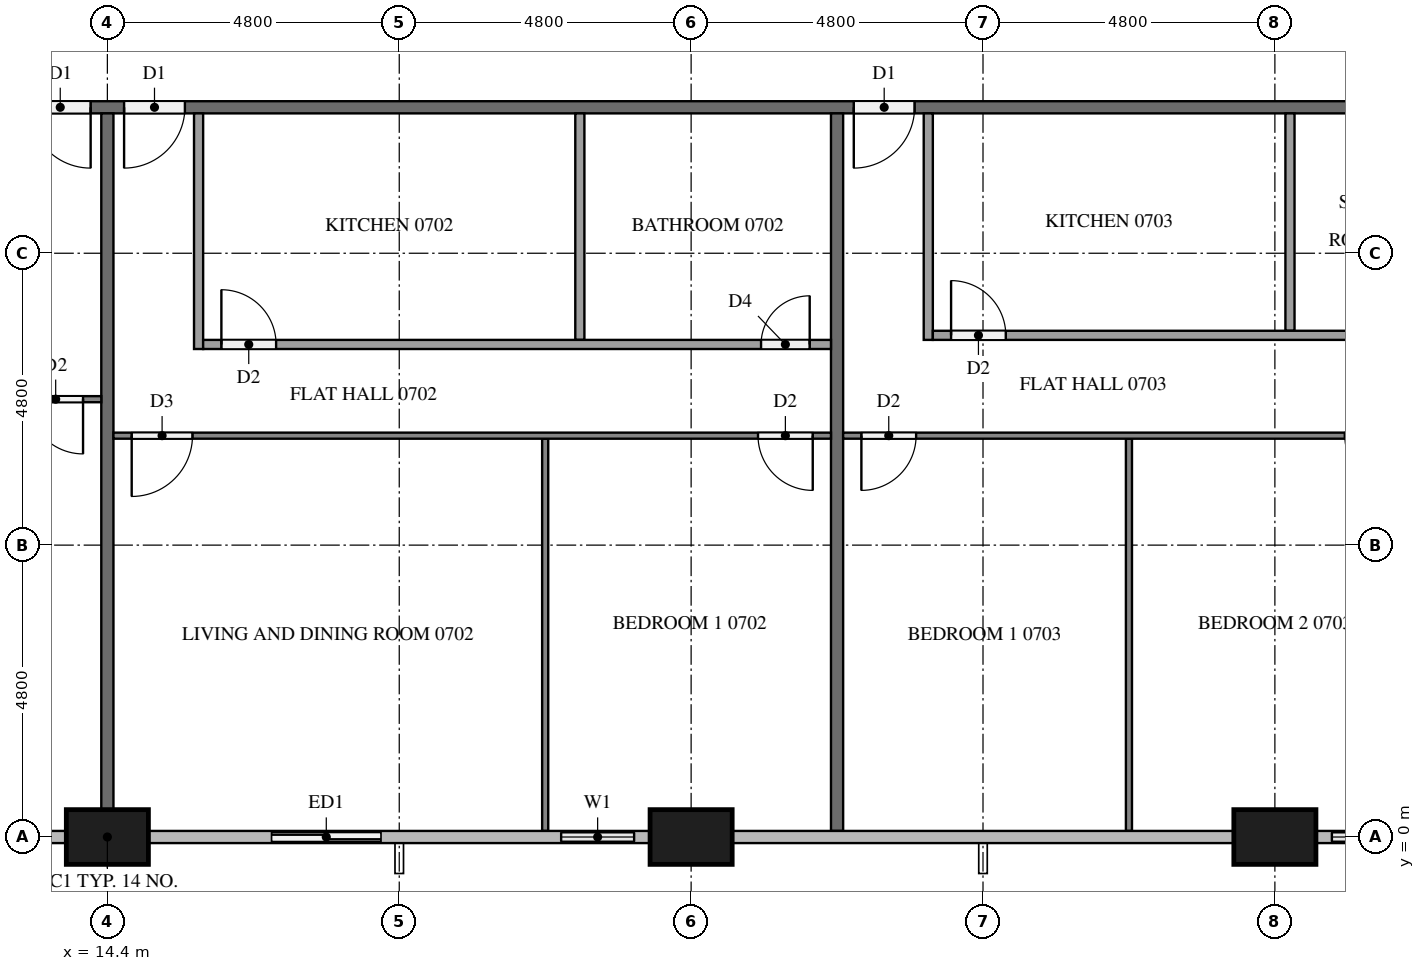
"""IFC4 building model, lengths in metres.
Left out: names, types, materials, properties, quantities, classifications, styles, units other than length and angle.
Written with IfcOpenShell. Run it as: python <this file> out.ifc"""

import sys

from ifc_helpers import new_model, si_unit, direction, frame, frame_2d, origin, origin_2d, place, context, subcontext, project, spatial, rectangle, extrude, element, fill, save


model = new_model("IFC4")
c1 = context("Model", 3, precision=1e-05, world=origin(), true_north=direction((0.0, 1.0)))
c2 = subcontext(c1, "Body", "Model", "MODEL_VIEW")
j1 = project(units=[si_unit("LENGTHUNIT", "METRE"), si_unit("PLANEANGLEUNIT", "RADIAN")], contexts=[c1])
p1 = place(None, origin())
s1 = spatial("IfcSite", under=j1, at=p1, CompositionType="ELEMENT")
p2 = place(p1, origin())
s2 = spatial("IfcBuilding", under=s1, at=p2, CompositionType="ELEMENT")
p3 = place(p2, frame((0.0, 0.0, 32.9)))
s3 = spatial("IfcBuildingStorey", under=s2, at=p3, CompositionType="ELEMENT", Elevation=32.9)
for number, where, z_axis, x_axis in (
    (1, (14.4, 0.0, 0.0), (0.0, 0.0, 1.0), (1.0, 0.0, 0.0)),
    (2, (24.0, 0.0, 0.0), (0.0, 0.0, 1.0), (1.0, 0.0, 0.0)),
    (3, (33.6, 0.0, 0.0), (0.0, 0.0, 1.0), (1.0, 0.0, 0.0)),
):
    element("IfcColumn", number, at=place(p3, frame(where, z_axis=z_axis, x_axis=x_axis)), inside=s3, PredefinedType="COLUMN", context=c2, shape_type="SweptSolid", body=[
        extrude(rectangle(XDim=1.35, YDim=0.9, at=origin_2d()), origin(), (0.0, 0.0, 1.0), 3.2),
    ])
p4 = place(p3, frame((12.0, 0.0, 0.0), z_axis=(0.0, 0.0, 1.0), x_axis=(1.0, 0.0, 0.0)))
e4 = element("IfcWall", 4, at=p4, inside=s3, PredefinedType="SOLIDWALL", context=c2, shape_type="SweptSolid", body=[
    extrude(rectangle(XDim=1.725, YDim=0.15, at=frame_2d((0.863, 0.0))), origin(), (0.0, 0.0, 1.0), 3.2),
])
p5 = place(p4, frame((0.262, 0.0, 0.9)))
e5 = element("IfcOpeningElement", 5, at=p5, cuts=e4, PredefinedType="OPENING", context=c2, shape_type="SweptSolid", body=[
    extrude(rectangle(XDim=1.2, YDim=1.4, at=frame_2d((0.6, 0.7))), frame((0.0, 0.085, 0.0), z_axis=(0.0, -1.0, 0.0), x_axis=(1.0, 0.0, 0.0)), (0.0, 0.0, 1.0), 0.17),
])
p6 = place(p3, frame((16.8, 0.0, 0.0), z_axis=(0.0, 0.0, 1.0), x_axis=(1.0, 0.0, 0.0)))
e6 = element("IfcWall", 6, at=p6, inside=s3, PredefinedType="SOLIDWALL", context=c2, shape_type="SweptSolid", body=[
    extrude(rectangle(XDim=2.4, YDim=0.15, at=frame_2d((1.2, 0.0))), origin(), (0.0, 0.0, 1.0), 3.2),
])
p7 = place(p6, frame((0.3, 0.0, 0.0)))
e7 = element("IfcOpeningElement", 7, at=p7, cuts=e6, PredefinedType="OPENING", context=c2, shape_type="SweptSolid", body=[
    extrude(rectangle(XDim=1.8, YDim=2.4, at=frame_2d((0.9, 1.2))), frame((0.0, 0.085, 0.0), z_axis=(0.0, -1.0, 0.0), x_axis=(1.0, 0.0, 0.0)), (0.0, 0.0, 1.0), 0.17),
])
p8 = place(p3, frame((21.6, 0.0, 0.0), z_axis=(0.0, 0.0, 1.0), x_axis=(1.0, 0.0, 0.0)))
e8 = element("IfcWall", 8, at=p8, inside=s3, PredefinedType="SOLIDWALL", context=c2, shape_type="SweptSolid", body=[
    extrude(rectangle(XDim=1.725, YDim=0.15, at=frame_2d((0.862, 0.0))), origin(), (0.0, 0.0, 1.0), 3.2),
])
p9 = place(p8, frame((0.262, 0.0, 0.9)))
e9 = element("IfcOpeningElement", 9, at=p9, cuts=e8, PredefinedType="OPENING", context=c2, shape_type="SweptSolid", body=[
    extrude(rectangle(XDim=1.2, YDim=1.4, at=frame_2d((0.6, 0.7))), frame((0.0, 0.085, 0.0), z_axis=(0.0, -1.0, 0.0), x_axis=(1.0, 0.0, 0.0)), (0.0, 0.0, 1.0), 0.17),
])
p10 = place(p3, frame((34.275, 0.0, 0.0), z_axis=(0.0, 0.0, 1.0), x_axis=(1.0, 0.0, 0.0)))
e10 = element("IfcWall", 10, at=p10, inside=s3, PredefinedType="SOLIDWALL", context=c2, shape_type="SweptSolid", body=[
    extrude(rectangle(XDim=4.125, YDim=0.15, at=frame_2d((2.062, 0.0))), origin(), (0.0, 0.0, 1.0), 3.2),
])
p11 = place(p10, frame((0.262, 0.0, 0.9)))
e11 = element("IfcOpeningElement", 11, at=p11, cuts=e10, PredefinedType="OPENING", context=c2, shape_type="SweptSolid", body=[
    extrude(rectangle(XDim=1.2, YDim=1.4, at=frame_2d((0.6, 0.7))), frame((0.0, 0.085, 0.0), z_axis=(0.0, -1.0, 0.0), x_axis=(1.0, 0.0, 0.0)), (0.0, 0.0, 1.0), 0.17),
])
p12 = place(p10, frame((2.025, 0.0, 0.0)))
e12 = element("IfcOpeningElement", 12, at=p12, cuts=e10, PredefinedType="OPENING", context=c2, shape_type="SweptSolid", body=[
    extrude(rectangle(XDim=1.8, YDim=2.4, at=frame_2d((0.9, 1.2))), frame((0.0, 0.085, 0.0), z_axis=(0.0, -1.0, 0.0), x_axis=(1.0, 0.0, 0.0)), (0.0, 0.0, 1.0), 0.17),
])
p13 = place(p3, frame((50.5, 12.0, 0.0), z_axis=(0.0, 0.0, 1.0), x_axis=(-1.0, 0.0, 0.0)))
e13 = element("IfcWall", 13, at=p13, inside=s3, PredefinedType="PARTITIONING", context=c2, shape_type="SweptSolid", body=[
    extrude(rectangle(XDim=38.6, YDim=0.2, at=frame_2d((19.3, 0.0))), origin(), (0.0, 0.0, 1.0), 3.2),
])
p14 = place(p13, frame((36.375, 0.0, 0.0)))
e14 = element("IfcOpeningElement", 14, at=p14, cuts=e13, PredefinedType="OPENING", context=c2, shape_type="SweptSolid", body=[
    extrude(rectangle(XDim=1.0, YDim=2.1, at=frame_2d((0.5, 1.05))), frame((0.0, 0.11, 0.0), z_axis=(0.0, -1.0, 0.0), x_axis=(1.0, 0.0, 0.0)), (0.0, 0.0, 1.0), 0.22),
])
p15 = place(p13, frame((34.825, 0.0, 0.0)))
e15 = element("IfcOpeningElement", 15, at=p15, cuts=e13, PredefinedType="OPENING", context=c2, shape_type="SweptSolid", body=[
    extrude(rectangle(XDim=1.0, YDim=2.1, at=frame_2d((0.5, 1.05))), frame((0.0, 0.11, 0.0), z_axis=(0.0, -1.0, 0.0), x_axis=(1.0, 0.0, 0.0)), (0.0, 0.0, 1.0), 0.22),
])
p16 = place(p13, frame((22.825, 0.0, 0.0)))
e16 = element("IfcOpeningElement", 16, at=p16, cuts=e13, PredefinedType="OPENING", context=c2, shape_type="SweptSolid", body=[
    extrude(rectangle(XDim=1.0, YDim=2.1, at=frame_2d((0.5, 1.05))), frame((0.0, 0.11, 0.0), z_axis=(0.0, -1.0, 0.0), x_axis=(1.0, 0.0, 0.0)), (0.0, 0.0, 1.0), 0.22),
])
p17 = place(p13, frame((8.425, 0.0, 0.0)))
e17 = element("IfcOpeningElement", 17, at=p17, cuts=e13, PredefinedType="OPENING", context=c2, shape_type="SweptSolid", body=[
    extrude(rectangle(XDim=1.0, YDim=2.1, at=frame_2d((0.5, 1.05))), frame((0.0, 0.11, 0.0), z_axis=(0.0, -1.0, 0.0), x_axis=(1.0, 0.0, 0.0)), (0.0, 0.0, 1.0), 0.22),
])
p18 = place(p13, frame((1.225, 0.0, 0.0)))
e18 = element("IfcOpeningElement", 18, at=p18, cuts=e13, PredefinedType="OPENING", context=c2, shape_type="SweptSolid", body=[
    extrude(rectangle(XDim=1.0, YDim=2.1, at=frame_2d((0.5, 1.05))), frame((0.0, 0.11, 0.0), z_axis=(0.0, -1.0, 0.0), x_axis=(1.0, 0.0, 0.0)), (0.0, 0.0, 1.0), 0.22),
])
p19 = place(p3, frame((14.4, 11.9, 0.0), z_axis=(0.0, 0.0, 1.0), x_axis=(0.0, -1.0, 0.0)))
e19 = element("IfcWall", 19, at=p19, inside=s3, PredefinedType="PARTITIONING", context=c2, shape_type="SweptSolid", body=[
    extrude(rectangle(XDim=11.45, YDim=0.2, at=frame_2d((5.725, 0.0))), origin(), (0.0, 0.0, 1.0), 3.2),
])
p20 = place(p3, frame((26.4, 11.9, 0.0), z_axis=(0.0, 0.0, 1.0), x_axis=(0.0, -1.0, 0.0)))
e20 = element("IfcWall", 20, at=p20, inside=s3, PredefinedType="PARTITIONING", context=c2, shape_type="SweptSolid", body=[
    extrude(rectangle(XDim=11.8, YDim=0.2, at=frame_2d((5.9, 0.0))), origin(), (0.0, 0.0, 1.0), 3.2),
])
p21 = place(p3, frame((14.3, 7.2, 0.0), z_axis=(0.0, 0.0, 1.0), x_axis=(-1.0, 0.0, 0.0)))
e21 = element("IfcWall", 21, at=p21, inside=s3, PredefinedType="PARTITIONING", context=c2, shape_type="SweptSolid", body=[
    extrude(rectangle(XDim=14.2, YDim=0.1, at=frame_2d((7.1, 0.0))), origin(), (0.0, 0.0, 1.0), 3.2),
])
p22 = place(p21, frame((0.3, 0.0, 0.0)))
e22 = element("IfcOpeningElement", 22, at=p22, cuts=e21, PredefinedType="OPENING", context=c2, shape_type="SweptSolid", body=[
    extrude(rectangle(XDim=0.9, YDim=2.1, at=frame_2d((0.45, 1.05))), frame((0.0, 0.06, 0.0), z_axis=(0.0, -1.0, 0.0), x_axis=(1.0, 0.0, 0.0)), (0.0, 0.0, 1.0), 0.12),
])
p23 = place(p21, frame((8.25, 0.0, 0.0)))
e23 = element("IfcOpeningElement", 23, at=p23, cuts=e21, PredefinedType="OPENING", context=c2, shape_type="SweptSolid", body=[
    extrude(rectangle(XDim=0.9, YDim=2.1, at=frame_2d((0.45, 1.05))), frame((0.0, 0.06, 0.0), z_axis=(0.0, -1.0, 0.0), x_axis=(1.0, 0.0, 0.0)), (0.0, 0.0, 1.0), 0.12),
])
p24 = place(p21, frame((9.85, 0.0, 0.0)))
e24 = element("IfcOpeningElement", 24, at=p24, cuts=e21, PredefinedType="OPENING", context=c2, shape_type="SweptSolid", body=[
    extrude(rectangle(XDim=1.0, YDim=2.1, at=frame_2d((0.5, 1.05))), frame((0.0, 0.06, 0.0), z_axis=(0.0, -1.0, 0.0), x_axis=(1.0, 0.0, 0.0)), (0.0, 0.0, 1.0), 0.12),
])
p25 = place(p3, frame((21.6, 6.55, 0.0), z_axis=(0.0, 0.0, 1.0), x_axis=(0.0, -1.0, 0.0)))
e25 = element("IfcWall", 25, at=p25, inside=s3, PredefinedType="PARTITIONING", context=c2, shape_type="SweptSolid", body=[
    extrude(rectangle(XDim=6.45, YDim=0.1, at=frame_2d((3.225, 0.0))), origin(), (0.0, 0.0, 1.0), 3.2),
])
p26 = place(p3, frame((26.3, 6.6, 0.0), z_axis=(0.0, 0.0, 1.0), x_axis=(-1.0, 0.0, 0.0)))
e26 = element("IfcWall", 26, at=p26, inside=s3, PredefinedType="PARTITIONING", context=c2, shape_type="SweptSolid", body=[
    extrude(rectangle(XDim=11.8, YDim=0.1, at=frame_2d((5.9, 0.0))), origin(), (0.0, 0.0, 1.0), 3.2),
])
p27 = place(p26, frame((10.5, 0.0, 0.0)))
e27 = element("IfcOpeningElement", 27, at=p27, cuts=e26, PredefinedType="OPENING", context=c2, shape_type="SweptSolid", body=[
    extrude(rectangle(XDim=1.0, YDim=2.1, at=frame_2d((0.5, 1.05))), frame((0.0, 0.06, 0.0), z_axis=(0.0, -1.0, 0.0), x_axis=(1.0, 0.0, 0.0)), (0.0, 0.0, 1.0), 0.12),
])
p28 = place(p26, frame((0.3, 0.0, 0.0)))
e28 = element("IfcOpeningElement", 28, at=p28, cuts=e26, PredefinedType="OPENING", context=c2, shape_type="SweptSolid", body=[
    extrude(rectangle(XDim=0.9, YDim=2.1, at=frame_2d((0.45, 1.05))), frame((0.0, 0.06, 0.0), z_axis=(0.0, -1.0, 0.0), x_axis=(1.0, 0.0, 0.0)), (0.0, 0.0, 1.0), 0.12),
])
p29 = place(p3, frame((22.17, 11.9, 0.0), z_axis=(0.0, 0.0, 1.0), x_axis=(0.0, -1.0, 0.0)))
e29 = element("IfcWall", 29, at=p29, inside=s3, PredefinedType="PARTITIONING", context=c2, shape_type="SweptSolid", body=[
    extrude(rectangle(XDim=3.725, YDim=0.15, at=frame_2d((1.862, 0.0))), origin(), (0.0, 0.0, 1.0), 3.2),
])
p30 = place(p3, frame((15.9, 11.9, 0.0), z_axis=(0.0, 0.0, 1.0), x_axis=(0.0, -1.0, 0.0)))
e30 = element("IfcWall", 30, at=p30, inside=s3, PredefinedType="PARTITIONING", context=c2, shape_type="SweptSolid", body=[
    extrude(rectangle(XDim=3.875, YDim=0.15, at=frame_2d((1.938, 0.0))), origin(), (0.0, 0.0, 1.0), 3.2),
])
p31 = place(p3, frame((15.975, 8.1, 0.0), z_axis=(0.0, 0.0, 1.0), x_axis=(1.0, 0.0, 0.0)))
e31 = element("IfcWall", 31, at=p31, inside=s3, PredefinedType="PARTITIONING", context=c2, shape_type="SweptSolid", body=[
    extrude(rectangle(XDim=10.325, YDim=0.15, at=frame_2d((5.163, 0.0))), origin(), (0.0, 0.0, 1.0), 3.2),
])
p32 = place(p31, frame((0.3, 0.0, 0.0)))
e32 = element("IfcOpeningElement", 32, at=p32, cuts=e31, PredefinedType="OPENING", context=c2, shape_type="SweptSolid", body=[
    extrude(rectangle(XDim=0.9, YDim=2.1, at=frame_2d((0.45, 1.05))), frame((0.0, 0.085, 0.0), z_axis=(0.0, -1.0, 0.0), x_axis=(1.0, 0.0, 0.0)), (0.0, 0.0, 1.0), 0.17),
])
p33 = place(p31, frame((9.175, 0.0, 0.0)))
e33 = element("IfcOpeningElement", 33, at=p33, cuts=e31, PredefinedType="OPENING", context=c2, shape_type="SweptSolid", body=[
    extrude(rectangle(XDim=0.8, YDim=2.1, at=frame_2d((0.4, 1.05))), frame((0.0, 0.085, 0.0), z_axis=(0.0, -1.0, 0.0), x_axis=(1.0, 0.0, 0.0)), (0.0, 0.0, 1.0), 0.17),
])
p34 = place(p3, frame((31.2, 6.55, 0.0), z_axis=(0.0, 0.0, 1.0), x_axis=(0.0, -1.0, 0.0)))
e34 = element("IfcWall", 34, at=p34, inside=s3, PredefinedType="PARTITIONING", context=c2, shape_type="SweptSolid", body=[
    extrude(rectangle(XDim=6.45, YDim=0.1, at=frame_2d((3.225, 0.0))), origin(), (0.0, 0.0, 1.0), 3.2),
])
p35 = place(p3, frame((40.7, 6.6, 0.0), z_axis=(0.0, 0.0, 1.0), x_axis=(-1.0, 0.0, 0.0)))
e35 = element("IfcWall", 35, at=p35, inside=s3, PredefinedType="PARTITIONING", context=c2, shape_type="SweptSolid", body=[
    extrude(rectangle(XDim=14.2, YDim=0.1, at=frame_2d((7.1, 0.0))), origin(), (0.0, 0.0, 1.0), 3.2),
])
p36 = place(p35, frame((13.0, 0.0, 0.0)))
e36 = element("IfcOpeningElement", 36, at=p36, cuts=e35, PredefinedType="OPENING", context=c2, shape_type="SweptSolid", body=[
    extrude(rectangle(XDim=0.9, YDim=2.1, at=frame_2d((0.45, 1.05))), frame((0.0, 0.06, 0.0), z_axis=(0.0, -1.0, 0.0), x_axis=(1.0, 0.0, 0.0)), (0.0, 0.0, 1.0), 0.12),
])
p37 = place(p35, frame((5.05, 0.0, 0.0)))
e37 = element("IfcOpeningElement", 37, at=p37, cuts=e35, PredefinedType="OPENING", context=c2, shape_type="SweptSolid", body=[
    extrude(rectangle(XDim=0.9, YDim=2.1, at=frame_2d((0.45, 1.05))), frame((0.0, 0.06, 0.0), z_axis=(0.0, -1.0, 0.0), x_axis=(1.0, 0.0, 0.0)), (0.0, 0.0, 1.0), 0.12),
])
p38 = place(p35, frame((3.35, 0.0, 0.0)))
e38 = element("IfcOpeningElement", 38, at=p38, cuts=e35, PredefinedType="OPENING", context=c2, shape_type="SweptSolid", body=[
    extrude(rectangle(XDim=1.0, YDim=2.1, at=frame_2d((0.5, 1.05))), frame((0.0, 0.06, 0.0), z_axis=(0.0, -1.0, 0.0), x_axis=(1.0, 0.0, 0.0)), (0.0, 0.0, 1.0), 0.12),
])
p39 = place(p3, frame((33.848, 11.9, 0.0), z_axis=(0.0, 0.0, 1.0), x_axis=(0.0, -1.0, 0.0)))
e39 = element("IfcWall", 39, at=p39, inside=s3, PredefinedType="PARTITIONING", context=c2, shape_type="SweptSolid", body=[
    extrude(rectangle(XDim=3.575, YDim=0.15, at=frame_2d((1.788, 0.0))), origin(), (0.0, 0.0, 1.0), 3.2),
])
p40 = place(p3, frame((27.9, 11.9, 0.0), z_axis=(0.0, 0.0, 1.0), x_axis=(0.0, -1.0, 0.0)))
e40 = element("IfcWall", 40, at=p40, inside=s3, PredefinedType="PARTITIONING", context=c2, shape_type="SweptSolid", body=[
    extrude(rectangle(XDim=3.725, YDim=0.15, at=frame_2d((1.862, 0.0))), origin(), (0.0, 0.0, 1.0), 3.2),
])
p41 = place(p3, frame((27.975, 8.25, 0.0), z_axis=(0.0, 0.0, 1.0), x_axis=(1.0, 0.0, 0.0)))
e41 = element("IfcWall", 41, at=p41, inside=s3, PredefinedType="PARTITIONING", context=c2, shape_type="SweptSolid", body=[
    extrude(rectangle(XDim=12.725, YDim=0.15, at=frame_2d((6.362, 0.0))), origin(), (0.0, 0.0, 1.0), 3.2),
])
p42 = place(p41, frame((0.3, 0.0, 0.0)))
e42 = element("IfcOpeningElement", 42, at=p42, cuts=e41, PredefinedType="OPENING", context=c2, shape_type="SweptSolid", body=[
    extrude(rectangle(XDim=0.9, YDim=2.1, at=frame_2d((0.45, 1.05))), frame((0.0, 0.085, 0.0), z_axis=(0.0, -1.0, 0.0), x_axis=(1.0, 0.0, 0.0)), (0.0, 0.0, 1.0), 0.17),
])
p43 = place(p41, frame((7.685, 0.0, 0.0)))
e43 = element("IfcOpeningElement", 43, at=p43, cuts=e41, PredefinedType="OPENING", context=c2, shape_type="SweptSolid", body=[
    extrude(rectangle(XDim=0.8, YDim=2.1, at=frame_2d((0.4, 1.05))), frame((0.0, 0.085, 0.0), z_axis=(0.0, -1.0, 0.0), x_axis=(1.0, 0.0, 0.0)), (0.0, 0.0, 1.0), 0.17),
])
p44 = place(p41, frame((9.135, 0.0, 0.0)))
e44 = element("IfcOpeningElement", 44, at=p44, cuts=e41, PredefinedType="OPENING", context=c2, shape_type="SweptSolid", body=[
    extrude(rectangle(XDim=0.9, YDim=2.1, at=frame_2d((0.45, 1.05))), frame((0.0, 0.085, 0.0), z_axis=(0.0, -1.0, 0.0), x_axis=(1.0, 0.0, 0.0)), (0.0, 0.0, 1.0), 0.17),
])
p45 = place(p7, origin())
e45 = element("IfcDoor", 45, at=p45, inside=s3, OperationType="SLIDING_TO_LEFT", PredefinedType="DOOR", context=c2, shape_type="SweptSolid", body=[
    extrude(rectangle(XDim=1.8, YDim=2.4, at=frame_2d((0.9, 1.2))), frame((0.0, 0.025, 0.0), z_axis=(0.0, -1.0, 0.0), x_axis=(1.0, 0.0, 0.0)), (0.0, 0.0, 1.0), 0.05),
])
fill(e7, e45)
p46 = place(p9, origin())
e46 = element("IfcWindow", 46, at=p46, inside=s3, PartitioningType="SINGLE_PANEL", PredefinedType="WINDOW", context=c2, shape_type="SweptSolid", body=[
    extrude(rectangle(XDim=1.2, YDim=1.4, at=frame_2d((0.6, 0.7))), frame((0.0, 0.03, 0.0), z_axis=(0.0, -1.0, 0.0), x_axis=(1.0, 0.0, 0.0)), (0.0, 0.0, 1.0), 0.06),
])
fill(e9, e46)
p47 = place(p11, origin())
e47 = element("IfcWindow", 47, at=p47, inside=s3, PartitioningType="SINGLE_PANEL", PredefinedType="WINDOW", context=c2, shape_type="SweptSolid", body=[
    extrude(rectangle(XDim=1.2, YDim=1.4, at=frame_2d((0.6, 0.7))), frame((0.0, 0.03, 0.0), z_axis=(0.0, -1.0, 0.0), x_axis=(1.0, 0.0, 0.0)), (0.0, 0.0, 1.0), 0.06),
])
fill(e11, e47)
p48 = place(p14, origin())
e48 = element("IfcDoor", 48, at=p48, inside=s3, OperationType="SINGLE_SWING_LEFT", PredefinedType="DOOR", context=c2, shape_type="SweptSolid", body=[
    extrude(rectangle(XDim=1.0, YDim=2.1, at=frame_2d((0.5, 1.05))), frame((0.0, 0.025, 0.0), z_axis=(0.0, -1.0, 0.0), x_axis=(1.0, 0.0, 0.0)), (0.0, 0.0, 1.0), 0.05),
])
fill(e14, e48)
p49 = place(p15, origin())
e49 = element("IfcDoor", 49, at=p49, inside=s3, OperationType="SINGLE_SWING_RIGHT", PredefinedType="DOOR", context=c2, shape_type="SweptSolid", body=[
    extrude(rectangle(XDim=1.0, YDim=2.1, at=frame_2d((0.5, 1.05))), frame((0.0, 0.025, 0.0), z_axis=(0.0, -1.0, 0.0), x_axis=(1.0, 0.0, 0.0)), (0.0, 0.0, 1.0), 0.05),
])
fill(e15, e49)
p50 = place(p16, origin())
e50 = element("IfcDoor", 50, at=p50, inside=s3, OperationType="SINGLE_SWING_RIGHT", PredefinedType="DOOR", context=c2, shape_type="SweptSolid", body=[
    extrude(rectangle(XDim=1.0, YDim=2.1, at=frame_2d((0.5, 1.05))), frame((0.0, 0.025, 0.0), z_axis=(0.0, -1.0, 0.0), x_axis=(1.0, 0.0, 0.0)), (0.0, 0.0, 1.0), 0.05),
])
fill(e16, e50)
p51 = place(p22, origin())
e51 = element("IfcDoor", 51, at=p51, inside=s3, OperationType="SINGLE_SWING_LEFT", PredefinedType="DOOR", context=c2, shape_type="SweptSolid", body=[
    extrude(rectangle(XDim=0.9, YDim=2.1, at=frame_2d((0.45, 1.05))), frame((0.0, 0.025, 0.0), z_axis=(0.0, -1.0, 0.0), x_axis=(1.0, 0.0, 0.0)), (0.0, 0.0, 1.0), 0.05),
])
fill(e22, e51)
p52 = place(p27, origin())
e52 = element("IfcDoor", 52, at=p52, inside=s3, OperationType="SINGLE_SWING_RIGHT", PredefinedType="DOOR", context=c2, shape_type="SweptSolid", body=[
    extrude(rectangle(XDim=1.0, YDim=2.1, at=frame_2d((0.5, 1.05))), frame((0.0, 0.025, 0.0), z_axis=(0.0, -1.0, 0.0), x_axis=(1.0, 0.0, 0.0)), (0.0, 0.0, 1.0), 0.05),
])
fill(e27, e52)
p53 = place(p28, origin())
e53 = element("IfcDoor", 53, at=p53, inside=s3, OperationType="SINGLE_SWING_LEFT", PredefinedType="DOOR", context=c2, shape_type="SweptSolid", body=[
    extrude(rectangle(XDim=0.9, YDim=2.1, at=frame_2d((0.45, 1.05))), frame((0.0, 0.025, 0.0), z_axis=(0.0, -1.0, 0.0), x_axis=(1.0, 0.0, 0.0)), (0.0, 0.0, 1.0), 0.05),
])
fill(e28, e53)
p54 = place(p32, origin())
e54 = element("IfcDoor", 54, at=p54, inside=s3, OperationType="SINGLE_SWING_LEFT", PredefinedType="DOOR", context=c2, shape_type="SweptSolid", body=[
    extrude(rectangle(XDim=0.9, YDim=2.1, at=frame_2d((0.45, 1.05))), frame((0.0, 0.025, 0.0), z_axis=(0.0, -1.0, 0.0), x_axis=(1.0, 0.0, 0.0)), (0.0, 0.0, 1.0), 0.05),
])
fill(e32, e54)
p55 = place(p33, origin())
e55 = element("IfcDoor", 55, at=p55, inside=s3, OperationType="SINGLE_SWING_RIGHT", PredefinedType="DOOR", context=c2, shape_type="SweptSolid", body=[
    extrude(rectangle(XDim=0.8, YDim=2.1, at=frame_2d((0.4, 1.05))), frame((0.0, 0.025, 0.0), z_axis=(0.0, -1.0, 0.0), x_axis=(1.0, 0.0, 0.0)), (0.0, 0.0, 1.0), 0.05),
])
fill(e33, e55)
p56 = place(p36, origin())
e56 = element("IfcDoor", 56, at=p56, inside=s3, OperationType="SINGLE_SWING_RIGHT", PredefinedType="DOOR", context=c2, shape_type="SweptSolid", body=[
    extrude(rectangle(XDim=0.9, YDim=2.1, at=frame_2d((0.45, 1.05))), frame((0.0, 0.025, 0.0), z_axis=(0.0, -1.0, 0.0), x_axis=(1.0, 0.0, 0.0)), (0.0, 0.0, 1.0), 0.05),
])
fill(e36, e56)
p57 = place(p37, origin())
e57 = element("IfcDoor", 57, at=p57, inside=s3, OperationType="SINGLE_SWING_LEFT", PredefinedType="DOOR", context=c2, shape_type="SweptSolid", body=[
    extrude(rectangle(XDim=0.9, YDim=2.1, at=frame_2d((0.45, 1.05))), frame((0.0, 0.025, 0.0), z_axis=(0.0, -1.0, 0.0), x_axis=(1.0, 0.0, 0.0)), (0.0, 0.0, 1.0), 0.05),
])
fill(e37, e57)
p58 = place(p42, origin())
e58 = element("IfcDoor", 58, at=p58, inside=s3, OperationType="SINGLE_SWING_LEFT", PredefinedType="DOOR", context=c2, shape_type="SweptSolid", body=[
    extrude(rectangle(XDim=0.9, YDim=2.1, at=frame_2d((0.45, 1.05))), frame((0.0, 0.025, 0.0), z_axis=(0.0, -1.0, 0.0), x_axis=(1.0, 0.0, 0.0)), (0.0, 0.0, 1.0), 0.05),
])
fill(e42, e58)
save(model, sys.argv[1])
